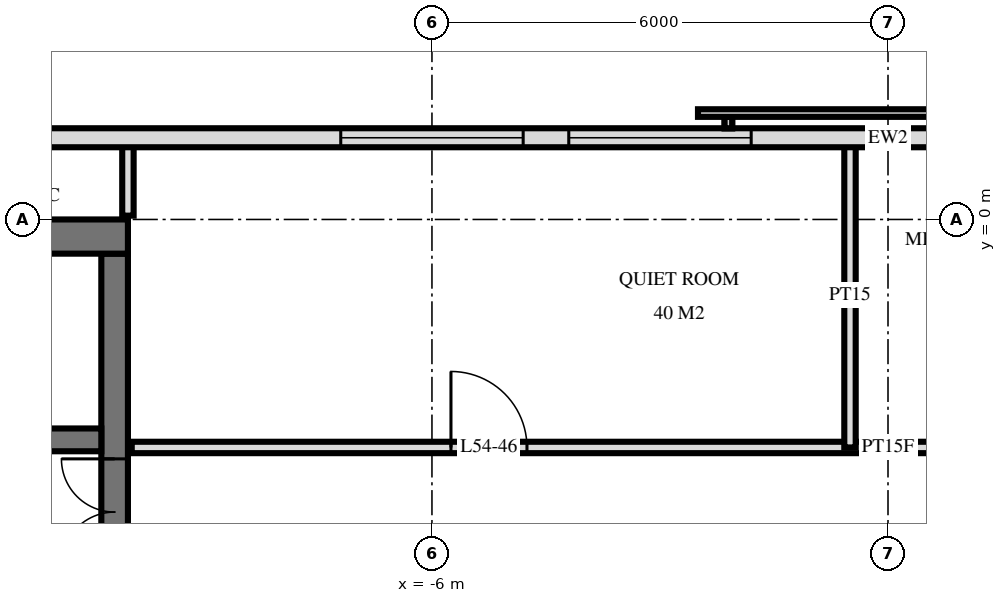
"""IFC4 building model, lengths in metres.
Left out: names, types, materials, properties, quantities, classifications, styles, units other than length and angle.
Written with IfcOpenShell. Run it as: python <this file> out.ifc"""

import sys

from ifc_helpers import new_model, si_unit, direction, frame, frame_2d, origin, place, context, subcontext, project, spatial, rectangle, extrude, element, fill, save


model = new_model("IFC4")
c1 = context("Model", 3, precision=1e-05, world=origin(), true_north=direction((0.0, 1.0)))
c2 = subcontext(c1, "Body", "Model", "MODEL_VIEW")
j1 = project(units=[si_unit("LENGTHUNIT", "METRE"), si_unit("PLANEANGLEUNIT", "RADIAN")], contexts=[c1])
p1 = place(None, origin())
s1 = spatial("IfcSite", under=j1, at=p1, CompositionType="ELEMENT")
p2 = place(p1, origin())
s2 = spatial("IfcBuilding", under=s1, at=p2, CompositionType="ELEMENT")
p3 = place(p2, frame((0.0, 0.0, 208.1)))
s3 = spatial("IfcBuildingStorey", under=s2, at=p3, CompositionType="ELEMENT", Elevation=208.1)
p4 = place(p3, frame((-24.5, -0.225, 0.0), z_axis=(0.0, 0.0, 1.0), x_axis=(1.0, 0.0, 0.0)))
e1 = element("IfcWall", 1, at=p4, inside=s3, PredefinedType="SHEAR", context=c2, shape_type="SweptSolid", body=[
    extrude(rectangle(XDim=14.5, YDim=0.45, at=frame_2d((7.25, 0.0))), origin(), (0.0, 0.0, 1.0), 3.5),
])
p5 = place(p3, frame((-10.175, -14.55, 0.0), z_axis=(0.0, 0.0, 1.0), x_axis=(0.0, 1.0, 0.0)))
e2 = element("IfcWall", 2, at=p5, inside=s3, PredefinedType="SHEAR", context=c2, shape_type="SweptSolid", body=[
    extrude(rectangle(XDim=14.1, YDim=0.35, at=frame_2d((7.05, 0.0))), origin(), (0.0, 0.0, 1.0), 3.5),
])
p6 = place(p5, frame((8.4, 0.0, 0.0)))
e3 = element("IfcOpeningElement", 3, at=p6, cuts=e2, PredefinedType="OPENING", context=c2, shape_type="SweptSolid", body=[
    extrude(rectangle(XDim=1.4, YDim=2.4, at=frame_2d((0.7, 1.2))), frame((0.0, 0.185, 0.0), z_axis=(0.0, -1.0, 0.0), x_axis=(1.0, 0.0, 0.0)), (0.0, 0.0, 1.0), 0.37),
])
p7 = place(p5, frame((10.0, 0.0, 0.0)))
e4 = element("IfcOpeningElement", 4, at=p7, cuts=e2, PredefinedType="OPENING", context=c2, shape_type="SweptSolid", body=[
    extrude(rectangle(XDim=1.4, YDim=2.4, at=frame_2d((0.7, 1.2))), frame((0.0, 0.185, 0.0), z_axis=(0.0, -1.0, 0.0), x_axis=(1.0, 0.0, 0.0)), (0.0, 0.0, 1.0), 0.37),
])
p8 = place(p5, frame((4.0, 0.0, 0.0)))
e5 = element("IfcOpeningElement", 5, at=p8, cuts=e2, PredefinedType="OPENING", context=c2, shape_type="SweptSolid", body=[
    extrude(rectangle(XDim=1.2, YDim=2.1, at=frame_2d((0.6, 1.05))), frame((0.0, 0.185, 0.0), z_axis=(0.0, -1.0, 0.0), x_axis=(1.0, 0.0, 0.0)), (0.0, 0.0, 1.0), 0.37),
])
p9 = place(p3, frame((-24.05, -2.9, 0.0), z_axis=(0.0, 0.0, 1.0), x_axis=(1.0, 0.0, 0.0)))
e6 = element("IfcWall", 6, at=p9, inside=s3, PredefinedType="SHEAR", context=c2, shape_type="SweptSolid", body=[
    extrude(rectangle(XDim=13.7, YDim=0.3, at=frame_2d((6.85, 0.0))), origin(), (0.0, 0.0, 1.0), 3.5),
])
p10 = place(p9, frame((0.55, 0.0, 0.0)))
e7 = element("IfcOpeningElement", 7, at=p10, cuts=e6, PredefinedType="OPENING", context=c2, shape_type="SweptSolid", body=[
    extrude(rectangle(XDim=1.1, YDim=2.1, at=frame_2d((0.55, 1.05))), frame((0.0, 0.16, 0.0), z_axis=(0.0, -1.0, 0.0), x_axis=(1.0, 0.0, 0.0)), (0.0, 0.0, 1.0), 0.32),
])
p11 = place(p9, frame((6.863, 0.0, 0.0)))
e8 = element("IfcOpeningElement", 8, at=p11, cuts=e6, PredefinedType="OPENING", context=c2, shape_type="SweptSolid", body=[
    extrude(rectangle(XDim=0.9, YDim=2.1, at=frame_2d((0.45, 1.05))), frame((0.0, 0.16, 0.0), z_axis=(0.0, -1.0, 0.0), x_axis=(1.0, 0.0, 0.0)), (0.0, 0.0, 1.0), 0.32),
])
p12 = place(p9, frame((5.438, 0.0, 0.0)))
e9 = element("IfcOpeningElement", 9, at=p12, cuts=e6, PredefinedType="OPENING", context=c2, shape_type="SweptSolid", body=[
    extrude(rectangle(XDim=0.9, YDim=2.1, at=frame_2d((0.45, 1.05))), frame((0.0, 0.16, 0.0), z_axis=(0.0, -1.0, 0.0), x_axis=(1.0, 0.0, 0.0)), (0.0, 0.0, 1.0), 0.32),
])
p13 = place(p9, frame((11.85, 0.0, 0.0)))
e10 = element("IfcOpeningElement", 10, at=p13, cuts=e6, PredefinedType="OPENING", context=c2, shape_type="SweptSolid", body=[
    extrude(rectangle(XDim=1.0, YDim=2.1, at=frame_2d((0.5, 1.05))), frame((0.0, 0.16, 0.0), z_axis=(0.0, -1.0, 0.0), x_axis=(1.0, 0.0, 0.0)), (0.0, 0.0, 1.0), 0.32),
])
p14 = place(p9, frame((9.562, 0.0, 0.0)))
e11 = element("IfcOpeningElement", 11, at=p14, cuts=e6, PredefinedType="OPENING", context=c2, shape_type="SweptSolid", body=[
    extrude(rectangle(XDim=1.0, YDim=2.1, at=frame_2d((0.5, 1.05))), frame((0.0, 0.16, 0.0), z_axis=(0.0, -1.0, 0.0), x_axis=(1.0, 0.0, 0.0)), (0.0, 0.0, 1.0), 0.32),
])
p15 = place(p9, frame((8.137, 0.0, 0.0)))
e12 = element("IfcOpeningElement", 12, at=p15, cuts=e6, PredefinedType="OPENING", context=c2, shape_type="SweptSolid", body=[
    extrude(rectangle(XDim=1.0, YDim=2.1, at=frame_2d((0.5, 1.05))), frame((0.0, 0.16, 0.0), z_axis=(0.0, -1.0, 0.0), x_axis=(1.0, 0.0, 0.0)), (0.0, 0.0, 1.0), 0.32),
])
p16 = place(p9, frame((3.0, 0.0, 0.0)))
e13 = element("IfcOpeningElement", 13, at=p16, cuts=e6, PredefinedType="OPENING", context=c2, shape_type="SweptSolid", body=[
    extrude(rectangle(XDim=1.0, YDim=2.1, at=frame_2d((0.5, 1.05))), frame((0.0, 0.16, 0.0), z_axis=(0.0, -1.0, 0.0), x_axis=(1.0, 0.0, 0.0)), (0.0, 0.0, 1.0), 0.32),
])
p17 = place(p3, frame((22.475, 1.075, 0.0), z_axis=(0.0, 0.0, 1.0), x_axis=(-1.0, 0.0, 0.0)))
e14 = element("IfcWall", 14, at=p17, inside=s3, PredefinedType="SOLIDWALL", context=c2, shape_type="SweptSolid", body=[
    extrude(rectangle(XDim=44.951, YDim=0.25, at=frame_2d((22.475, 0.0))), origin(), (0.0, 0.0, 1.0), 3.22),
])
p18 = place(p17, frame((18.275, 0.0, 0.9)))
e15 = element("IfcOpeningElement", 15, at=p18, cuts=e14, PredefinedType="OPENING", context=c2, shape_type="SweptSolid", body=[
    extrude(rectangle(XDim=2.4, YDim=1.5, at=frame_2d((1.2, 0.75))), frame((0.0, 0.135, 0.0), z_axis=(0.0, -1.0, 0.0), x_axis=(1.0, 0.0, 0.0)), (0.0, 0.0, 1.0), 0.27),
])
p19 = place(p17, frame((24.275, 0.0, 0.9)))
e16 = element("IfcOpeningElement", 16, at=p19, cuts=e14, PredefinedType="OPENING", context=c2, shape_type="SweptSolid", body=[
    extrude(rectangle(XDim=2.4, YDim=1.5, at=frame_2d((1.2, 0.75))), frame((0.0, 0.135, 0.0), z_axis=(0.0, -1.0, 0.0), x_axis=(1.0, 0.0, 0.0)), (0.0, 0.0, 1.0), 0.27),
])
p20 = place(p17, frame((27.275, 0.0, 0.9)))
e17 = element("IfcOpeningElement", 17, at=p20, cuts=e14, PredefinedType="OPENING", context=c2, shape_type="SweptSolid", body=[
    extrude(rectangle(XDim=2.4, YDim=1.5, at=frame_2d((1.2, 0.75))), frame((0.0, 0.135, 0.0), z_axis=(0.0, -1.0, 0.0), x_axis=(1.0, 0.0, 0.0)), (0.0, 0.0, 1.0), 0.27),
])
p21 = place(p3, frame((-0.5, -3.0, 0.0), z_axis=(0.0, 0.0, 1.0), x_axis=(0.0, 1.0, 0.0)))
e18 = element("IfcWall", 18, at=p21, inside=s3, PredefinedType="PARTITIONING", context=c2, shape_type="SweptSolid", body=[
    extrude(rectangle(XDim=4.02, YDim=0.15, at=frame_2d((2.01, 0.0))), origin(), (0.0, 0.0, 1.0), 3.22),
])
p22 = place(p3, frame((-10.0, 0.05, 0.0), z_axis=(0.0, 0.0, 1.0), x_axis=(0.0, 1.0, 0.0)))
e19 = element("IfcWall", 19, at=p22, inside=s3, PredefinedType="PARTITIONING", context=c2, shape_type="SweptSolid", body=[
    extrude(rectangle(XDim=0.97, YDim=0.15, at=frame_2d((0.485, 0.0))), origin(), (0.0, 0.0, 1.0), 3.22),
])
p23 = place(p3, frame((-9.95, -3.0, 0.0), z_axis=(0.0, 0.0, 1.0), x_axis=(1.0, 0.0, 0.0)))
e20 = element("IfcWall", 20, at=p23, inside=s3, PredefinedType="PARTITIONING", context=c2, shape_type="SweptSolid", body=[
    extrude(rectangle(XDim=19.9, YDim=0.15, at=frame_2d((9.95, 0.0))), origin(), (0.0, 0.0, 1.0), 3.22),
])
p24 = place(p23, frame((4.2, 0.0, 0.0)))
e21 = element("IfcOpeningElement", 21, at=p24, cuts=e20, PredefinedType="OPENING", context=c2, shape_type="SweptSolid", body=[
    extrude(rectangle(XDim=1.0, YDim=2.1, at=frame_2d((0.5, 1.05))), frame((0.0, 0.085, 0.0), z_axis=(0.0, -1.0, 0.0), x_axis=(1.0, 0.0, 0.0)), (0.0, 0.0, 1.0), 0.17),
])
p25 = place(p23, frame((11.45, 0.0, 0.0)))
e22 = element("IfcOpeningElement", 22, at=p25, cuts=e20, PredefinedType="OPENING", context=c2, shape_type="SweptSolid", body=[
    extrude(rectangle(XDim=1.0, YDim=2.1, at=frame_2d((0.5, 1.05))), frame((0.0, 0.085, 0.0), z_axis=(0.0, -1.0, 0.0), x_axis=(1.0, 0.0, 0.0)), (0.0, 0.0, 1.0), 0.17),
])
p26 = place(p23, frame((15.45, 0.0, 0.0)))
e23 = element("IfcOpeningElement", 23, at=p26, cuts=e20, PredefinedType="OPENING", context=c2, shape_type="SweptSolid", body=[
    extrude(rectangle(XDim=1.0, YDim=2.1, at=frame_2d((0.5, 1.05))), frame((0.0, 0.085, 0.0), z_axis=(0.0, -1.0, 0.0), x_axis=(1.0, 0.0, 0.0)), (0.0, 0.0, 1.0), 0.17),
])
p27 = place(p23, frame((18.2, 0.0, 0.0)))
e24 = element("IfcOpeningElement", 24, at=p27, cuts=e20, PredefinedType="OPENING", context=c2, shape_type="SweptSolid", body=[
    extrude(rectangle(XDim=1.0, YDim=2.1, at=frame_2d((0.5, 1.05))), frame((0.0, 0.085, 0.0), z_axis=(0.0, -1.0, 0.0), x_axis=(1.0, 0.0, 0.0)), (0.0, 0.0, 1.0), 0.17),
])
p28 = place(p19, origin())
e25 = element("IfcWindow", 25, at=p28, inside=s3, PartitioningType="SINGLE_PANEL", PredefinedType="WINDOW", context=c2, shape_type="SweptSolid", body=[
    extrude(rectangle(XDim=2.4, YDim=1.5, at=frame_2d((1.2, 0.75))), frame((0.0, 0.03, 0.0), z_axis=(0.0, -1.0, 0.0), x_axis=(1.0, 0.0, 0.0)), (0.0, 0.0, 1.0), 0.06),
])
fill(e16, e25)
p29 = place(p20, origin())
e26 = element("IfcWindow", 26, at=p29, inside=s3, PartitioningType="SINGLE_PANEL", PredefinedType="WINDOW", context=c2, shape_type="SweptSolid", body=[
    extrude(rectangle(XDim=2.4, YDim=1.5, at=frame_2d((1.2, 0.75))), frame((0.0, 0.03, 0.0), z_axis=(0.0, -1.0, 0.0), x_axis=(1.0, 0.0, 0.0)), (0.0, 0.0, 1.0), 0.06),
])
fill(e17, e26)
p30 = place(p7, origin())
e27 = element("IfcDoor", 27, at=p30, inside=s3, OperationType="DOUBLE_DOOR_SINGLE_SWING", PredefinedType="DOOR", context=c2, shape_type="SweptSolid", body=[
    extrude(rectangle(XDim=1.4, YDim=2.4, at=frame_2d((0.7, 1.2))), frame((0.0, 0.025, 0.0), z_axis=(0.0, -1.0, 0.0), x_axis=(1.0, 0.0, 0.0)), (0.0, 0.0, 1.0), 0.05),
])
fill(e4, e27)
p31 = place(p24, origin())
e28 = element("IfcDoor", 28, at=p31, inside=s3, OperationType="SINGLE_SWING_RIGHT", PredefinedType="DOOR", context=c2, shape_type="SweptSolid", body=[
    extrude(rectangle(XDim=1.0, YDim=2.1, at=frame_2d((0.5, 1.05))), frame((0.0, 0.025, 0.0), z_axis=(0.0, -1.0, 0.0), x_axis=(1.0, 0.0, 0.0)), (0.0, 0.0, 1.0), 0.05),
])
fill(e21, e28)
save(model, sys.argv[1])
